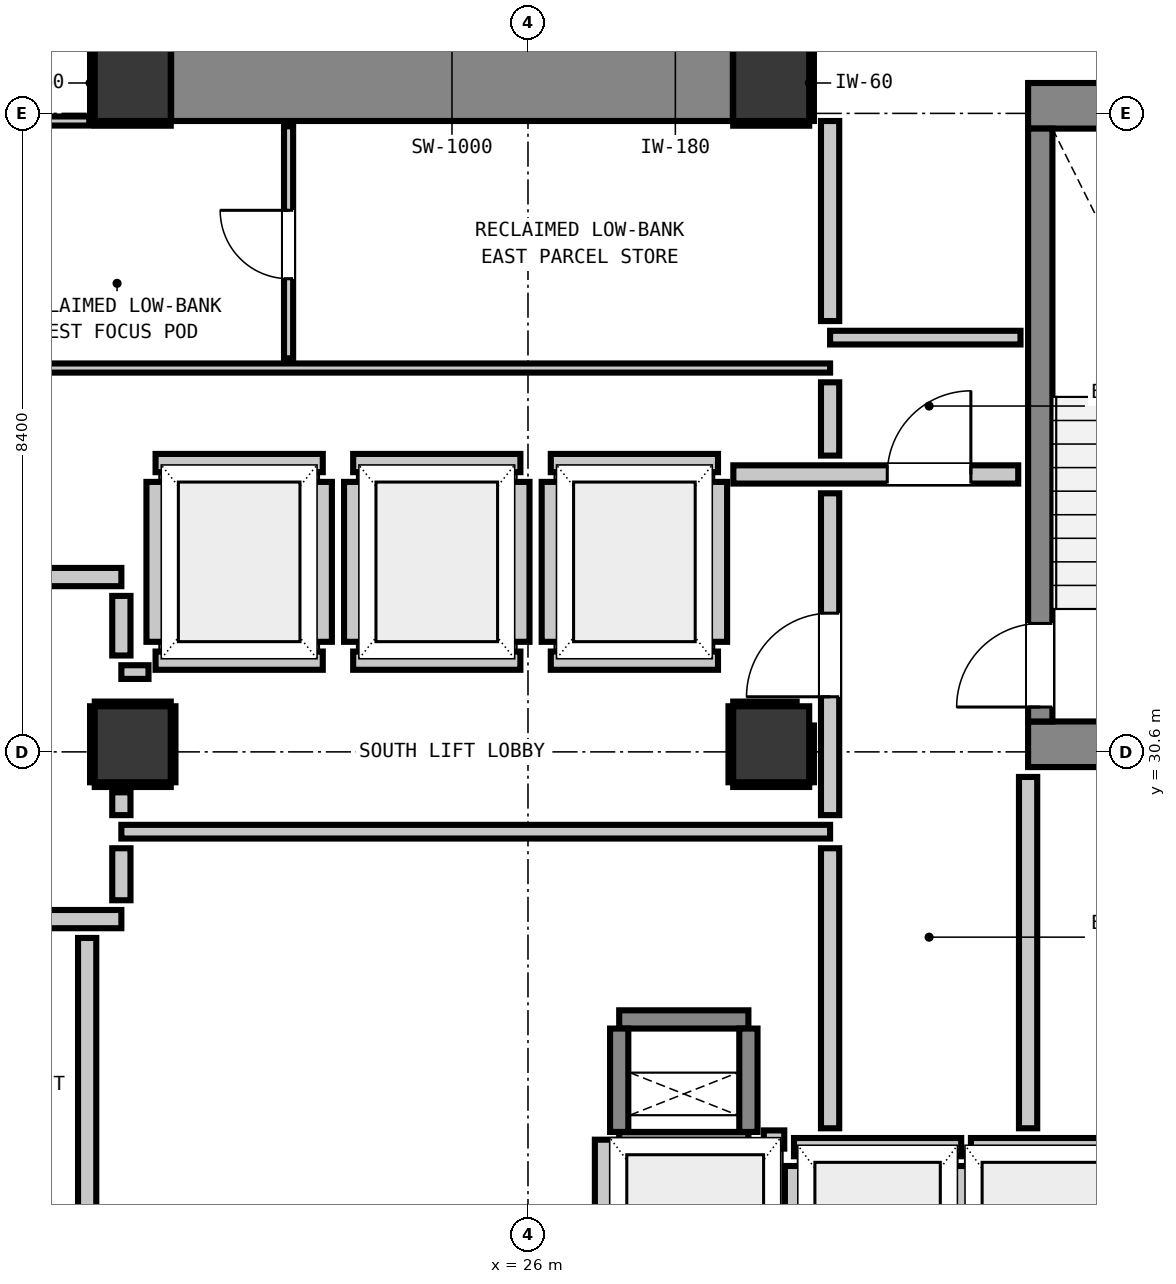
"""IFC4 building model, lengths in metres.
Left out: names, types, materials, properties, quantities, classifications, styles, units other than length and angle.
Written with IfcOpenShell. Run it as: python <this file> out.ifc"""

import sys

from ifc_helpers import new_model, si_unit, direction, frame, frame_2d, origin, origin_2d, place, context, subcontext, project, spatial, rectangle, extrude, element, fill, save


model = new_model("IFC4")
c1 = context("Model", 3, precision=1e-05, world=origin(), true_north=direction((0.0, 1.0)))
c2 = subcontext(c1, "Body", "Model", "MODEL_VIEW")
j1 = project(units=[si_unit("LENGTHUNIT", "METRE"), si_unit("PLANEANGLEUNIT", "RADIAN")], contexts=[c1])
p1 = place(None, origin())
s1 = spatial("IfcSite", under=j1, at=p1, CompositionType="ELEMENT")
p2 = place(p1, origin())
s2 = spatial("IfcBuilding", under=s1, at=p2, CompositionType="ELEMENT")
p3 = place(p2, frame((0.0, 0.0, 126.0)))
s3 = spatial("IfcBuildingStorey", under=s2, at=p3, CompositionType="ELEMENT", Elevation=126.0)
for number, where, z_axis, x_axis in (
    (1, (20.8, 39.4, 0.0), (0.0, 0.0, 1.0), (1.0, 0.0, 0.0)),
    (2, (29.2, 39.4, 0.0), (0.0, 0.0, 1.0), (1.0, 0.0, 0.0)),
):
    element("IfcColumn", number, at=place(p3, frame(where, z_axis=z_axis, x_axis=x_axis)), inside=s3, PredefinedType="COLUMN", context=c2, shape_type="SweptSolid", body=[
        extrude(rectangle(XDim=1.0, YDim=1.0, at=origin_2d()), origin(), (0.0, 0.0, 1.0), 3.32),
    ])
p4 = place(p3, frame((32.58, 39.1, 0.0), z_axis=(0.0, 0.0, 1.0), x_axis=(1.0, 0.0, 0.0)))
e3 = element("IfcWall", 3, at=p4, inside=s3, PredefinedType="SHEAR", context=c2, shape_type="SweptSolid", body=[
    extrude(rectangle(XDim=4.08, YDim=0.6, at=frame_2d((2.04, 0.0))), origin(), (0.0, 0.0, 1.0), 3.32),
])
p5 = place(p3, frame((32.58, 30.7, 0.0), z_axis=(0.0, 0.0, 1.0), x_axis=(1.0, 0.0, 0.0)))
e4 = element("IfcWall", 4, at=p5, inside=s3, PredefinedType="SHEAR", context=c2, shape_type="SweptSolid", body=[
    extrude(rectangle(XDim=3.415, YDim=0.6, at=frame_2d((1.708, 0.0))), origin(), (0.0, 0.0, 1.0), 3.32),
])
p6 = place(p3, frame((21.305, 39.4, 0.0), z_axis=(0.0, 0.0, 1.0), x_axis=(1.0, 0.0, 0.0)))
e5 = element("IfcWall", 5, at=p6, inside=s3, PredefinedType="SHEAR", context=c2, shape_type="SweptSolid", body=[
    extrude(rectangle(XDim=7.39, YDim=1.0, at=frame_2d((3.695, 0.0))), origin(), (0.0, 0.0, 1.0), 3.32),
])
p7 = place(p3, frame((32.74, 31.0, 0.0), z_axis=(0.0, 0.0, 1.0), x_axis=(0.0, 1.0, 0.0)))
e6 = element("IfcWall", 6, at=p7, inside=s3, PredefinedType="SHEAR", context=c2, shape_type="SweptSolid", body=[
    extrude(rectangle(XDim=7.8, YDim=0.32, at=frame_2d((3.9, 0.0))), origin(), (0.0, 0.0, 1.0), 3.32),
])
p8 = place(p7, frame((0.19, 0.0, 0.0)))
e7 = element("IfcOpeningElement", 7, at=p8, cuts=e6, PredefinedType="OPENING", context=c2, shape_type="SweptSolid", body=[
    extrude(rectangle(XDim=1.1, YDim=2.15, at=frame_2d((0.55, 1.075))), frame((0.0, 0.17, 0.0), z_axis=(0.0, -1.0, 0.0), x_axis=(1.0, 0.0, 0.0)), (0.0, 0.0, 1.0), 0.34),
])
for number, where, z_axis, x_axis in (
    (8, (27.2, 25.48, 0.0), (0.0, 0.0, 1.0), (1.0, 0.0, 0.0)),
    (9, (27.2, 27.08, 0.0), (0.0, 0.0, 1.0), (1.0, 0.0, 0.0)),
):
    element("IfcWall", number, at=place(p3, frame(where, z_axis=z_axis, x_axis=x_axis)), inside=s3, PredefinedType="SHEAR", context=c2, shape_type="SweptSolid", body=[
        extrude(rectangle(XDim=1.7, YDim=0.24, at=frame_2d((0.85, 0.0))), origin(), (0.0, 0.0, 1.0), 3.32),
    ])
for number, where, z_axis, x_axis in (
    (10, (27.2, 25.6, 0.0), (0.0, 0.0, 1.0), (0.0, 1.0, 0.0)),
    (11, (28.9, 25.6, 0.0), (0.0, 0.0, 1.0), (0.0, 1.0, 0.0)),
):
    element("IfcWall", number, at=place(p3, frame(where, z_axis=z_axis, x_axis=x_axis)), inside=s3, PredefinedType="SHEAR", context=c2, shape_type="SweptSolid", body=[
        extrude(rectangle(XDim=1.36, YDim=0.24, at=frame_2d((0.68, 0.0))), origin(), (0.0, 0.0, 1.0), 3.32),
    ])
for number, where, z_axis, x_axis in (
    (12, (20.8, 30.7, 0.0), (0.0, 0.0, 1.0), (1.0, 0.0, 0.0)),
    (13, (29.2, 30.7, 0.0), (0.0, 0.0, 1.0), (1.0, 0.0, 0.0)),
):
    element("IfcColumn", number, at=place(p3, frame(where, z_axis=z_axis, x_axis=x_axis)), inside=s3, PredefinedType="COLUMN", context=c2, shape_type="SweptSolid", body=[
        extrude(rectangle(XDim=1.0, YDim=1.0, at=origin_2d()), origin(), (0.0, 0.0, 1.0), 3.32),
    ])
for number, where, z_axis, x_axis in (
    (14, (21.1, 31.8, 0.0), (0.0, 0.0, 1.0), (1.0, 0.0, 0.0)),
    (15, (21.1, 34.4, 0.0), (0.0, 0.0, 1.0), (1.0, 0.0, 0.0)),
):
    element("IfcWall", number, at=place(p3, frame(where, z_axis=z_axis, x_axis=x_axis)), inside=s3, PredefinedType="PARTITIONING", context=c2, shape_type="SweptSolid", body=[
        extrude(rectangle(XDim=2.2, YDim=0.24, at=frame_2d((1.1, 0.0))), origin(), (0.0, 0.0, 1.0), 3.08),
    ])
p9 = place(p3, frame((21.1, 32.048, 0.0), z_axis=(0.0, 0.0, 1.0), x_axis=(0.0, 1.0, 0.0)))
e16 = element("IfcWall", 16, at=p9, inside=s3, PredefinedType="PARTITIONING", context=c2, shape_type="SweptSolid", body=[
    extrude(rectangle(XDim=2.104, YDim=0.24, at=frame_2d((1.052, 0.0))), origin(), (0.0, 0.0, 1.0), 2.315),
])
p10 = place(p3, frame((23.3, 32.048, 0.0), z_axis=(0.0, 0.0, 1.0), x_axis=(0.0, 1.0, 0.0)))
e17 = element("IfcWall", 17, at=p10, inside=s3, PredefinedType="PARTITIONING", context=c2, shape_type="SweptSolid", body=[
    extrude(rectangle(XDim=2.104, YDim=0.24, at=frame_2d((1.052, 0.0))), origin(), (0.0, 0.0, 1.0), 3.08),
])
for number, where, z_axis, x_axis in (
    (18, (23.7, 31.8, 0.0), (0.0, 0.0, 1.0), (1.0, 0.0, 0.0)),
    (19, (23.7, 34.4, 0.0), (0.0, 0.0, 1.0), (1.0, 0.0, 0.0)),
):
    element("IfcWall", number, at=place(p3, frame(where, z_axis=z_axis, x_axis=x_axis)), inside=s3, PredefinedType="PARTITIONING", context=c2, shape_type="SweptSolid", body=[
        extrude(rectangle(XDim=2.2, YDim=0.24, at=frame_2d((1.1, 0.0))), origin(), (0.0, 0.0, 1.0), 3.08),
    ])
for number, where, z_axis, x_axis in (
    (20, (23.7, 32.048, 0.0), (0.0, 0.0, 1.0), (0.0, 1.0, 0.0)),
    (21, (25.9, 32.048, 0.0), (0.0, 0.0, 1.0), (0.0, 1.0, 0.0)),
):
    element("IfcWall", number, at=place(p3, frame(where, z_axis=z_axis, x_axis=x_axis)), inside=s3, PredefinedType="PARTITIONING", context=c2, shape_type="SweptSolid", body=[
        extrude(rectangle(XDim=2.104, YDim=0.24, at=frame_2d((1.052, 0.0))), origin(), (0.0, 0.0, 1.0), 3.08),
    ])
for number, where, z_axis, x_axis in (
    (22, (26.3, 31.8, 0.0), (0.0, 0.0, 1.0), (1.0, 0.0, 0.0)),
    (23, (26.3, 34.4, 0.0), (0.0, 0.0, 1.0), (1.0, 0.0, 0.0)),
):
    element("IfcWall", number, at=place(p3, frame(where, z_axis=z_axis, x_axis=x_axis)), inside=s3, PredefinedType="PARTITIONING", context=c2, shape_type="SweptSolid", body=[
        extrude(rectangle(XDim=2.2, YDim=0.24, at=frame_2d((1.1, 0.0))), origin(), (0.0, 0.0, 1.0), 3.08),
    ])
for number, where, z_axis, x_axis in (
    (24, (26.3, 32.048, 0.0), (0.0, 0.0, 1.0), (0.0, 1.0, 0.0)),
    (25, (28.5, 32.048, 0.0), (0.0, 0.0, 1.0), (0.0, 1.0, 0.0)),
):
    element("IfcWall", number, at=place(p3, frame(where, z_axis=z_axis, x_axis=x_axis)), inside=s3, PredefinedType="PARTITIONING", context=c2, shape_type="SweptSolid", body=[
        extrude(rectangle(XDim=2.104, YDim=0.24, at=frame_2d((1.052, 0.0))), origin(), (0.0, 0.0, 1.0), 3.08),
    ])
p11 = place(p3, frame((29.5, 25.4, 0.0), z_axis=(0.0, 0.0, 1.0), x_axis=(1.0, 0.0, 0.0)))
e26 = element("IfcWall", 26, at=p11, inside=s3, PredefinedType="PARTITIONING", context=c2, shape_type="SweptSolid", body=[
    extrude(rectangle(XDim=2.2, YDim=0.24, at=frame_2d((1.1, 0.0))), origin(), (0.0, 0.0, 1.0), 3.08),
])
p12 = place(p3, frame((29.5, 22.632, 0.0), z_axis=(0.0, 0.0, 1.0), x_axis=(0.0, 1.0, 0.0)))
e27 = element("IfcWall", 27, at=p12, inside=s3, PredefinedType="PARTITIONING", context=c2, shape_type="SweptSolid", body=[
    extrude(rectangle(XDim=2.52, YDim=0.24, at=frame_2d((1.26, 0.0))), origin(), (0.0, 0.0, 1.0), 2.315),
])
p13 = place(p3, frame((31.7, 22.63, 0.0), z_axis=(0.0, 0.0, 1.0), x_axis=(0.0, 1.0, 0.0)))
e28 = element("IfcWall", 28, at=p13, inside=s3, PredefinedType="PARTITIONING", context=c2, shape_type="SweptSolid", body=[
    extrude(rectangle(XDim=2.522, YDim=0.24, at=frame_2d((1.261, 0.0))), origin(), (0.0, 0.0, 1.0), 3.08),
])
p14 = place(p3, frame((31.828, 25.4, 0.0), z_axis=(0.0, 0.0, 1.0), x_axis=(1.0, 0.0, 0.0)))
e29 = element("IfcWall", 29, at=p14, inside=s3, PredefinedType="PARTITIONING", context=c2, shape_type="SweptSolid", body=[
    extrude(rectangle(XDim=2.072, YDim=0.24, at=frame_2d((1.036, 0.0))), origin(), (0.0, 0.0, 1.0), 3.08),
])
p15 = place(p3, frame((29.103, 25.5, 0.0), z_axis=(0.0, 0.0, 1.0), x_axis=(1.0, 0.0, 0.0)))
e30 = element("IfcWall", 30, at=p15, inside=s3, PredefinedType="PARTITIONING", context=c2, shape_type="SweptSolid", body=[
    extrude(rectangle(XDim=0.269, YDim=0.24, at=frame_2d((0.135, 0.0))), origin(), (0.0, 0.0, 1.0), 3.08),
])
p16 = place(p3, frame((27.0, 22.63, 0.0), z_axis=(0.0, 0.0, 1.0), x_axis=(0.0, 1.0, 0.0)))
e31 = element("IfcWall", 31, at=p16, inside=s3, PredefinedType="PARTITIONING", context=c2, shape_type="SweptSolid", body=[
    extrude(rectangle(XDim=2.868, YDim=0.24, at=frame_2d((1.434, 0.0))), origin(), (0.0, 0.0, 1.0), 3.08),
])
p17 = place(p3, frame((17.45, 28.4, 0.0), z_axis=(0.0, 0.0, 1.0), x_axis=(1.0, 0.0, 0.0)))
e32 = element("IfcWall", 32, at=p17, inside=s3, PredefinedType="PARTITIONING", context=c2, shape_type="SweptSolid", body=[
    extrude(rectangle(XDim=3.2, YDim=0.24, at=frame_2d((1.6, 0.0))), origin(), (0.0, 0.0, 1.0), 3.08),
])
p18 = place(p17, frame((0.784, 0.0, 0.0)))
e33 = element("IfcOpeningElement", 33, at=p18, cuts=e32, PredefinedType="OPENING", context=c2, shape_type="SweptSolid", body=[
    extrude(rectangle(XDim=1.1, YDim=2.15, at=frame_2d((0.55, 1.075))), frame((0.0, 0.13, 0.0), z_axis=(0.0, -1.0, 0.0), x_axis=(1.0, 0.0, 0.0)), (0.0, 0.0, 1.0), 0.26),
])
p19 = place(p3, frame((17.45, 32.9, 0.0), z_axis=(0.0, 0.0, 1.0), x_axis=(1.0, 0.0, 0.0)))
e34 = element("IfcWall", 34, at=p19, inside=s3, PredefinedType="PARTITIONING", context=c2, shape_type="SweptSolid", body=[
    extrude(rectangle(XDim=3.2, YDim=0.24, at=frame_2d((1.6, 0.0))), origin(), (0.0, 0.0, 1.0), 3.08),
])
p20 = place(p19, frame((0.159, 0.0, 0.0)))
e35 = element("IfcOpeningElement", 35, at=p20, cuts=e34, PredefinedType="OPENING", context=c2, shape_type="SweptSolid", body=[
    extrude(rectangle(XDim=1.1, YDim=2.15, at=frame_2d((0.55, 1.075))), frame((0.0, 0.13, 0.0), z_axis=(0.0, -1.0, 0.0), x_axis=(1.0, 0.0, 0.0)), (0.0, 0.0, 1.0), 0.26),
])
p21 = place(p3, frame((28.702, 34.25, 0.0), z_axis=(0.0, 0.0, 1.0), x_axis=(1.0, 0.0, 0.0)))
e36 = element("IfcWall", 36, at=p21, inside=s3, PredefinedType="PARTITIONING", context=c2, shape_type="SweptSolid", body=[
    extrude(rectangle(XDim=3.748, YDim=0.24, at=frame_2d((1.874, 0.0))), origin(), (0.0, 0.0, 1.0), 3.08),
])
p22 = place(p21, frame((2.025, 0.0, 0.0)))
e37 = element("IfcOpeningElement", 37, at=p22, cuts=e36, PredefinedType="OPENING", context=c2, shape_type="SweptSolid", body=[
    extrude(rectangle(XDim=1.1, YDim=2.15, at=frame_2d((0.55, 1.075))), frame((0.0, 0.13, 0.0), z_axis=(0.0, -1.0, 0.0), x_axis=(1.0, 0.0, 0.0)), (0.0, 0.0, 1.0), 0.26),
])
p23 = place(p3, frame((20.65, 29.55, 0.0), z_axis=(0.0, 0.0, 1.0), x_axis=(1.0, 0.0, 0.0)))
e38 = element("IfcWall", 38, at=p23, inside=s3, PredefinedType="PARTITIONING", context=c2, shape_type="SweptSolid", body=[
    extrude(rectangle(XDim=9.325, YDim=0.18, at=frame_2d((4.663, 0.0))), origin(), (0.0, 0.0, 1.0), 3.08),
])
p24 = place(p3, frame((20.65, 31.65, 0.0), z_axis=(0.0, 0.0, 1.0), x_axis=(1.0, 0.0, 0.0)))
e39 = element("IfcWall", 39, at=p24, inside=s3, PredefinedType="PARTITIONING", context=c2, shape_type="SweptSolid", body=[
    extrude(rectangle(XDim=0.357, YDim=0.18, at=frame_2d((0.179, 0.0))), origin(), (0.0, 0.0, 1.0), 3.08),
])
p25 = place(p3, frame((29.975, 36.05, 0.0), z_axis=(0.0, 0.0, 1.0), x_axis=(1.0, 0.0, 0.0)))
e40 = element("IfcWall", 40, at=p25, inside=s3, PredefinedType="PARTITIONING", context=c2, shape_type="SweptSolid", body=[
    extrude(rectangle(XDim=2.505, YDim=0.18, at=frame_2d((1.252, 0.0))), origin(), (0.0, 0.0, 1.0), 3.08),
])
p26 = place(p3, frame((18.95, 35.65, 0.0), z_axis=(0.0, 0.0, 1.0), x_axis=(1.0, 0.0, 0.0)))
e41 = element("IfcWall", 41, at=p26, inside=s3, PredefinedType="PARTITIONING", context=c2, shape_type="SweptSolid", body=[
    extrude(rectangle(XDim=11.025, YDim=0.12, at=frame_2d((5.513, 0.0))), origin(), (0.0, 0.0, 1.0), 3.08),
])
p27 = place(p3, frame((18.95, 38.9, 0.0), z_axis=(0.0, 0.0, 1.0), x_axis=(1.0, 0.0, 0.0)))
e42 = element("IfcWall", 42, at=p27, inside=s3, PredefinedType="PARTITIONING", context=c2, shape_type="SweptSolid", body=[
    extrude(rectangle(XDim=1.278, YDim=0.12, at=frame_2d((0.639, 0.0))), origin(), (0.0, 0.0, 1.0), 3.08),
])
p28 = place(p3, frame((20.2, 22.586, 0.0), z_axis=(0.0, 0.0, 1.0), x_axis=(0.0, 1.0, 0.0)))
e43 = element("IfcWall", 43, at=p28, inside=s3, PredefinedType="PARTITIONING", context=c2, shape_type="SweptSolid", body=[
    extrude(rectangle(XDim=5.566, YDim=0.24, at=frame_2d((2.783, 0.0))), origin(), (0.0, 0.0, 1.0), 3.08),
])
p29 = place(p3, frame((20.65, 28.648, 0.0), z_axis=(0.0, 0.0, 1.0), x_axis=(0.0, 1.0, 0.0)))
e44 = element("IfcWall", 44, at=p29, inside=s3, PredefinedType="PARTITIONING", context=c2, shape_type="SweptSolid", body=[
    extrude(rectangle(XDim=0.684, YDim=0.24, at=frame_2d((0.342, 0.0))), origin(), (0.0, 0.0, 1.0), 2.315),
])
p30 = place(p3, frame((20.65, 29.768, 0.0), z_axis=(0.0, 0.0, 1.0), x_axis=(0.0, 1.0, 0.0)))
e45 = element("IfcWall", 45, at=p30, inside=s3, PredefinedType="PARTITIONING", context=c2, shape_type="SweptSolid", body=[
    extrude(rectangle(XDim=0.3, YDim=0.24, at=frame_2d((0.15, 0.0))), origin(), (0.0, 0.0, 1.0), 2.315),
])
p31 = place(p3, frame((20.65, 31.868, 0.0), z_axis=(0.0, 0.0, 1.0), x_axis=(0.0, 1.0, 0.0)))
e46 = element("IfcWall", 46, at=p31, inside=s3, PredefinedType="PARTITIONING", context=c2, shape_type="SweptSolid", body=[
    extrude(rectangle(XDim=0.784, YDim=0.24, at=frame_2d((0.392, 0.0))), origin(), (0.0, 0.0, 1.0), 2.315),
])
p32 = place(p3, frame((29.975, 25.648, 0.0), z_axis=(0.0, 0.0, 1.0), x_axis=(0.0, 1.0, 0.0)))
e47 = element("IfcWall", 47, at=p32, inside=s3, PredefinedType="PARTITIONING", context=c2, shape_type="SweptSolid", body=[
    extrude(rectangle(XDim=3.684, YDim=0.24, at=frame_2d((1.842, 0.0))), origin(), (0.0, 0.0, 1.0), 3.08),
])
p33 = place(p3, frame((29.975, 29.768, 0.0), z_axis=(0.0, 0.0, 1.0), x_axis=(0.0, 1.0, 0.0)))
e48 = element("IfcWall", 48, at=p33, inside=s3, PredefinedType="PARTITIONING", context=c2, shape_type="SweptSolid", body=[
    extrude(rectangle(XDim=4.234, YDim=0.24, at=frame_2d((2.117, 0.0))), origin(), (0.0, 0.0, 1.0), 3.08),
])
p34 = place(p33, frame((1.557, 0.0, 0.0)))
e49 = element("IfcOpeningElement", 49, at=p34, cuts=e48, PredefinedType="OPENING", context=c2, shape_type="SweptSolid", body=[
    extrude(rectangle(XDim=1.1, YDim=2.15, at=frame_2d((0.55, 1.075))), frame((0.0, 0.13, 0.0), z_axis=(0.0, -1.0, 0.0), x_axis=(1.0, 0.0, 0.0)), (0.0, 0.0, 1.0), 0.26),
])
p35 = place(p3, frame((29.975, 34.498, 0.0), z_axis=(0.0, 0.0, 1.0), x_axis=(0.0, 1.0, 0.0)))
e50 = element("IfcWall", 50, at=p35, inside=s3, PredefinedType="PARTITIONING", context=c2, shape_type="SweptSolid", body=[
    extrude(rectangle(XDim=0.964, YDim=0.24, at=frame_2d((0.482, 0.0))), origin(), (0.0, 0.0, 1.0), 3.08),
])
p36 = place(p3, frame((29.975, 36.268, 0.0), z_axis=(0.0, 0.0, 1.0), x_axis=(0.0, 1.0, 0.0)))
e51 = element("IfcWall", 51, at=p36, inside=s3, PredefinedType="PARTITIONING", context=c2, shape_type="SweptSolid", body=[
    extrude(rectangle(XDim=2.632, YDim=0.24, at=frame_2d((1.316, 0.0))), origin(), (0.0, 0.0, 1.0), 3.08),
])
p37 = place(p3, frame((32.58, 25.648, 0.0), z_axis=(0.0, 0.0, 1.0), x_axis=(0.0, 1.0, 0.0)))
e52 = element("IfcWall", 52, at=p37, inside=s3, PredefinedType="PARTITIONING", context=c2, shape_type="SweptSolid", body=[
    extrude(rectangle(XDim=4.622, YDim=0.24, at=frame_2d((2.311, 0.0))), origin(), (0.0, 0.0, 1.0), 3.08),
])
p38 = place(p3, frame((22.85, 35.778, 0.0), z_axis=(0.0, 0.0, 1.0), x_axis=(0.0, 1.0, 0.0)))
e53 = element("IfcWall", 53, at=p38, inside=s3, PredefinedType="PARTITIONING", context=c2, shape_type="SweptSolid", body=[
    extrude(rectangle(XDim=3.052, YDim=0.12, at=frame_2d((1.526, 0.0))), origin(), (0.0, 0.0, 1.0), 3.08),
])
p39 = place(p38, frame((1.047, 0.0, 0.0)))
e54 = element("IfcOpeningElement", 54, at=p39, cuts=e53, PredefinedType="OPENING", context=c2, shape_type="SweptSolid", body=[
    extrude(rectangle(XDim=0.9, YDim=2.1, at=frame_2d((0.45, 1.05))), frame((0.0, 0.07, 0.0), z_axis=(0.0, -1.0, 0.0), x_axis=(1.0, 0.0, 0.0)), (0.0, 0.0, 1.0), 0.14),
])
for number, where, z_axis, x_axis in (
    (55, (20.3, 38.868, 0.0), (0.0, 0.0, 1.0), (1.0, 0.0, 0.0)),
    (56, (20.268, 38.9, 0.0), (0.0, 0.0, 1.0), (0.0, 1.0, 0.0)),
    (57, (28.7, 38.868, 0.0), (0.0, 0.0, 1.0), (1.0, 0.0, 0.0)),
    (58, (29.732, 38.9, 0.0), (0.0, 0.0, 1.0), (0.0, 1.0, 0.0)),
    (59, (20.3, 30.168, 0.0), (0.0, 0.0, 1.0), (1.0, 0.0, 0.0)),
    (60, (20.3, 31.232, 0.0), (0.0, 0.0, 1.0), (1.0, 0.0, 0.0)),
    (61, (20.268, 30.2, 0.0), (0.0, 0.0, 1.0), (0.0, 1.0, 0.0)),
    (62, (21.332, 30.2, 0.0), (0.0, 0.0, 1.0), (0.0, 1.0, 0.0)),
    (63, (28.7, 30.168, 0.0), (0.0, 0.0, 1.0), (1.0, 0.0, 0.0)),
):
    element("IfcWall", number, at=place(p3, frame(where, z_axis=z_axis, x_axis=x_axis)), inside=s3, PredefinedType="PARTITIONING", context=c2, shape_type="SweptSolid", body=[
        extrude(rectangle(XDim=1.0, YDim=0.06, at=frame_2d((0.5, 0.0))), origin(), (0.0, 0.0, 1.0), 1.45),
    ])
p40 = place(p3, frame((28.7, 31.232, 0.0), z_axis=(0.0, 0.0, 1.0), x_axis=(1.0, 0.0, 0.0)))
e64 = element("IfcWall", 64, at=p40, inside=s3, PredefinedType="PARTITIONING", context=c2, shape_type="SweptSolid", body=[
    extrude(rectangle(XDim=0.835, YDim=0.06, at=frame_2d((0.417, 0.0))), origin(), (0.0, 0.0, 1.0), 1.45),
])
p41 = place(p3, frame((28.668, 30.2, 0.0), z_axis=(0.0, 0.0, 1.0), x_axis=(0.0, 1.0, 0.0)))
e65 = element("IfcWall", 65, at=p41, inside=s3, PredefinedType="PARTITIONING", context=c2, shape_type="SweptSolid", body=[
    extrude(rectangle(XDim=1.0, YDim=0.06, at=frame_2d((0.5, 0.0))), origin(), (0.0, 0.0, 1.0), 1.45),
])
p42 = place(p3, frame((29.732, 30.2, 0.0), z_axis=(0.0, 0.0, 1.0), x_axis=(0.0, 1.0, 0.0)))
e66 = element("IfcWall", 66, at=p42, inside=s3, PredefinedType="PARTITIONING", context=c2, shape_type="SweptSolid", body=[
    extrude(rectangle(XDim=0.747, YDim=0.06, at=frame_2d((0.374, 0.0))), origin(), (0.0, 0.0, 1.0), 1.45),
])
p43 = place(p8, origin())
e67 = element("IfcDoor", 67, at=p43, inside=s3, OperationType="SINGLE_SWING_LEFT", PredefinedType="DOOR", context=c2, shape_type="SweptSolid", body=[
    extrude(rectangle(XDim=1.1, YDim=2.15, at=frame_2d((0.55, 1.075))), frame((0.0, 0.025, 0.0), z_axis=(0.0, -1.0, 0.0), x_axis=(1.0, 0.0, 0.0)), (0.0, 0.0, 1.0), 0.05),
])
fill(e7, e67)
p44 = place(p34, origin())
e68 = element("IfcDoor", 68, at=p44, inside=s3, OperationType="SINGLE_SWING_LEFT", PredefinedType="DOOR", context=c2, shape_type="SweptSolid", body=[
    extrude(rectangle(XDim=1.1, YDim=2.15, at=frame_2d((0.55, 1.075))), frame((0.0, 0.025, 0.0), z_axis=(0.0, -1.0, 0.0), x_axis=(1.0, 0.0, 0.0)), (0.0, 0.0, 1.0), 0.05),
])
fill(e49, e68)
p45 = place(p22, origin())
e69 = element("IfcDoor", 69, at=p45, inside=s3, OperationType="SINGLE_SWING_RIGHT", PredefinedType="DOOR", context=c2, shape_type="SweptSolid", body=[
    extrude(rectangle(XDim=1.1, YDim=2.15, at=frame_2d((0.55, 1.075))), frame((0.0, 0.025, 0.0), z_axis=(0.0, -1.0, 0.0), x_axis=(1.0, 0.0, 0.0)), (0.0, 0.0, 1.0), 0.05),
])
fill(e37, e69)
p46 = place(p39, origin())
e70 = element("IfcDoor", 70, at=p46, inside=s3, OperationType="SINGLE_SWING_RIGHT", PredefinedType="DOOR", context=c2, shape_type="SweptSolid", body=[
    extrude(rectangle(XDim=0.9, YDim=2.1, at=frame_2d((0.45, 1.05))), frame((0.0, 0.025, 0.0), z_axis=(0.0, -1.0, 0.0), x_axis=(1.0, 0.0, 0.0)), (0.0, 0.0, 1.0), 0.05),
])
fill(e54, e70)
save(model, sys.argv[1])
